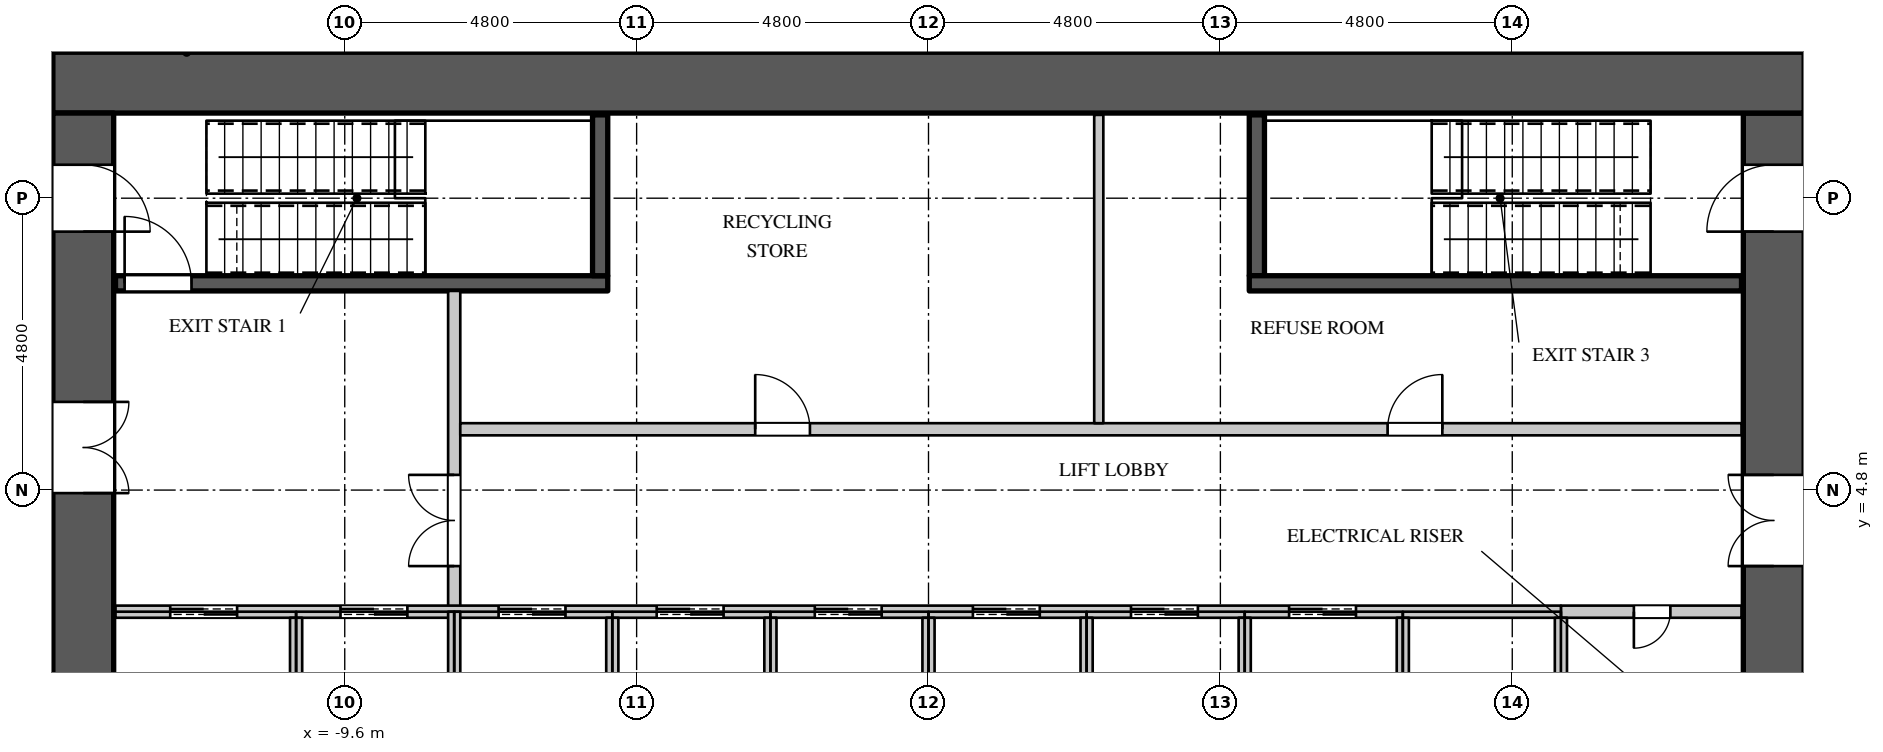
"""IFC4 building model, lengths in metres.
Left out: names, types, materials, properties, quantities, classifications, styles, units other than length and angle.
Written with IfcOpenShell. Run it as: python <this file> out.ifc"""

import sys

from ifc_helpers import new_model, si_unit, direction, frame, frame_2d, origin, place, context, subcontext, project, spatial, rectangle, extrude, element, fill, save


model = new_model("IFC4")
c1 = context("Model", 3, precision=1e-05, world=origin(), true_north=direction((0.0, 1.0)))
c2 = subcontext(c1, "Body", "Model", "MODEL_VIEW")
j1 = project(units=[si_unit("LENGTHUNIT", "METRE"), si_unit("PLANEANGLEUNIT", "RADIAN")], contexts=[c1])
p1 = place(None, origin())
s1 = spatial("IfcSite", under=j1, at=p1, CompositionType="ELEMENT")
p2 = place(p1, origin())
s2 = spatial("IfcBuilding", under=s1, at=p2, CompositionType="ELEMENT")
p3 = place(p2, frame((0.0, 0.0, 92.7)))
s3 = spatial("IfcBuildingStorey", under=s2, at=p3, CompositionType="ELEMENT", Elevation=92.7)
p4 = place(p3, frame((-14.4, 11.5, 0.0), z_axis=(0.0, 0.0, 1.0), x_axis=(1.0, 0.0, 0.0)))
e1 = element("IfcWall", 1, at=p4, inside=s3, PredefinedType="SHEAR", context=c2, shape_type="SweptSolid", body=[
    extrude(rectangle(XDim=28.8, YDim=1.0, at=frame_2d((14.4, 0.0))), origin(), (0.0, 0.0, 1.0), 4.2),
])
p5 = place(p3, frame((13.9, -11.0, 0.0), z_axis=(0.0, 0.0, 1.0), x_axis=(0.0, 1.0, 0.0)))
e2 = element("IfcWall", 2, at=p5, inside=s3, PredefinedType="SHEAR", context=c2, shape_type="SweptSolid", body=[
    extrude(rectangle(XDim=22.0, YDim=1.0, at=frame_2d((11.0, 0.0))), origin(), (0.0, 0.0, 1.0), 4.2),
])
p6 = place(p5, frame((20.05, 0.0, 0.0)))
e3 = element("IfcOpeningElement", 3, at=p6, cuts=e2, PredefinedType="OPENING", context=c2, shape_type="SweptSolid", body=[
    extrude(rectangle(XDim=1.1, YDim=2.2, at=frame_2d((0.55, 1.1))), frame((0.0, 0.51, 0.0), z_axis=(0.0, -1.0, 0.0), x_axis=(1.0, 0.0, 0.0)), (0.0, 0.0, 1.0), 1.02),
])
p7 = place(p5, frame((0.85, 0.0, 0.0)))
e4 = element("IfcOpeningElement", 4, at=p7, cuts=e2, PredefinedType="OPENING", context=c2, shape_type="SweptSolid", body=[
    extrude(rectangle(XDim=1.1, YDim=2.2, at=frame_2d((0.55, 1.1))), frame((0.0, 0.51, 0.0), z_axis=(0.0, -1.0, 0.0), x_axis=(1.0, 0.0, 0.0)), (0.0, 0.0, 1.0), 1.02),
])
p8 = place(p5, frame((14.55, 0.0, 0.0)))
e5 = element("IfcOpeningElement", 5, at=p8, cuts=e2, PredefinedType="OPENING", context=c2, shape_type="SweptSolid", body=[
    extrude(rectangle(XDim=1.5, YDim=2.4, at=frame_2d((0.75, 1.2))), frame((0.0, 0.51, 0.0), z_axis=(0.0, -1.0, 0.0), x_axis=(1.0, 0.0, 0.0)), (0.0, 0.0, 1.0), 1.02),
])
p9 = place(p5, frame((5.95, 0.0, 0.0)))
e6 = element("IfcOpeningElement", 6, at=p9, cuts=e2, PredefinedType="OPENING", context=c2, shape_type="SweptSolid", body=[
    extrude(rectangle(XDim=1.5, YDim=2.4, at=frame_2d((0.75, 1.2))), frame((0.0, 0.51, 0.0), z_axis=(0.0, -1.0, 0.0), x_axis=(1.0, 0.0, 0.0)), (0.0, 0.0, 1.0), 1.02),
])
p10 = place(p3, frame((-13.9, -11.0, 0.0), z_axis=(0.0, 0.0, 1.0), x_axis=(0.0, 1.0, 0.0)))
e7 = element("IfcWall", 7, at=p10, inside=s3, PredefinedType="SHEAR", context=c2, shape_type="SweptSolid", body=[
    extrude(rectangle(XDim=22.0, YDim=1.0, at=frame_2d((11.0, 0.0))), origin(), (0.0, 0.0, 1.0), 4.2),
])
p11 = place(p10, frame((20.05, 0.0, 0.0)))
e8 = element("IfcOpeningElement", 8, at=p11, cuts=e7, PredefinedType="OPENING", context=c2, shape_type="SweptSolid", body=[
    extrude(rectangle(XDim=1.1, YDim=2.2, at=frame_2d((0.55, 1.1))), frame((0.0, 0.51, 0.0), z_axis=(0.0, -1.0, 0.0), x_axis=(1.0, 0.0, 0.0)), (0.0, 0.0, 1.0), 1.02),
])
p12 = place(p10, frame((0.85, 0.0, 0.0)))
e9 = element("IfcOpeningElement", 9, at=p12, cuts=e7, PredefinedType="OPENING", context=c2, shape_type="SweptSolid", body=[
    extrude(rectangle(XDim=1.1, YDim=2.2, at=frame_2d((0.55, 1.1))), frame((0.0, 0.51, 0.0), z_axis=(0.0, -1.0, 0.0), x_axis=(1.0, 0.0, 0.0)), (0.0, 0.0, 1.0), 1.02),
])
p13 = place(p10, frame((15.75, 0.0, 0.0)))
e10 = element("IfcOpeningElement", 10, at=p13, cuts=e7, PredefinedType="OPENING", context=c2, shape_type="SweptSolid", body=[
    extrude(rectangle(XDim=1.5, YDim=2.4, at=frame_2d((0.75, 1.2))), frame((0.0, 0.51, 0.0), z_axis=(0.0, -1.0, 0.0), x_axis=(1.0, 0.0, 0.0)), (0.0, 0.0, 1.0), 1.02),
])
p14 = place(p10, frame((4.75, 0.0, 0.0)))
e11 = element("IfcOpeningElement", 11, at=p14, cuts=e7, PredefinedType="OPENING", context=c2, shape_type="SweptSolid", body=[
    extrude(rectangle(XDim=1.5, YDim=2.4, at=frame_2d((0.75, 1.2))), frame((0.0, 0.51, 0.0), z_axis=(0.0, -1.0, 0.0), x_axis=(1.0, 0.0, 0.0)), (0.0, 0.0, 1.0), 1.02),
])
p15 = place(p3, frame((-7.8, 2.8, 0.0), z_axis=(0.0, 0.0, 1.0), x_axis=(0.0, 1.0, 0.0)))
e12 = element("IfcWall", 12, at=p15, inside=s3, PredefinedType="PARTITIONING", context=c2, shape_type="SweptSolid", body=[
    extrude(rectangle(XDim=5.275, YDim=0.2, at=frame_2d((2.637, 0.0))), origin(), (0.0, 0.0, 1.0), 3.798),
])
p16 = place(p15, frame((0.75, 0.0, 0.0)))
e13 = element("IfcOpeningElement", 13, at=p16, cuts=e12, PredefinedType="OPENING", context=c2, shape_type="SweptSolid", body=[
    extrude(rectangle(XDim=1.5, YDim=2.4, at=frame_2d((0.75, 1.2))), frame((0.0, 0.11, 0.0), z_axis=(0.0, -1.0, 0.0), x_axis=(1.0, 0.0, 0.0)), (0.0, 0.0, 1.0), 0.22),
])
p17 = place(p3, frame((-7.7, 5.8, 0.0), z_axis=(0.0, 0.0, 1.0), x_axis=(1.0, 0.0, 0.0)))
e14 = element("IfcWall", 14, at=p17, inside=s3, PredefinedType="PARTITIONING", context=c2, shape_type="SweptSolid", body=[
    extrude(rectangle(XDim=21.07, YDim=0.2, at=frame_2d((10.535, 0.0))), origin(), (0.0, 0.0, 1.0), 3.798),
])
p18 = place(p17, frame((4.85, 0.0, 0.0)))
e15 = element("IfcOpeningElement", 15, at=p18, cuts=e14, PredefinedType="OPENING", context=c2, shape_type="SweptSolid", body=[
    extrude(rectangle(XDim=0.9, YDim=2.2, at=frame_2d((0.45, 1.1))), frame((0.0, 0.11, 0.0), z_axis=(0.0, -1.0, 0.0), x_axis=(1.0, 0.0, 0.0)), (0.0, 0.0, 1.0), 0.22),
])
p19 = place(p17, frame((15.25, 0.0, 0.0)))
e16 = element("IfcOpeningElement", 16, at=p19, cuts=e14, PredefinedType="OPENING", context=c2, shape_type="SweptSolid", body=[
    extrude(rectangle(XDim=0.9, YDim=2.2, at=frame_2d((0.45, 1.1))), frame((0.0, 0.11, 0.0), z_axis=(0.0, -1.0, 0.0), x_axis=(1.0, 0.0, 0.0)), (0.0, 0.0, 1.0), 0.22),
])
p20 = place(p3, frame((2.8, 5.9, 0.0), z_axis=(0.0, 0.0, 1.0), x_axis=(0.0, 1.0, 0.0)))
e17 = element("IfcWall", 17, at=p20, inside=s3, PredefinedType="PARTITIONING", context=c2, shape_type="SweptSolid", body=[
    extrude(rectangle(XDim=5.07, YDim=0.15, at=frame_2d((2.535, 0.0))), origin(), (0.0, 0.0, 1.0), 3.798),
])
p21 = place(p3, frame((10.4, 2.8, 0.0), z_axis=(0.0, 0.0, 1.0), x_axis=(1.0, 0.0, 0.0)))
e18 = element("IfcWall", 18, at=p21, inside=s3, PredefinedType="PARTITIONING", context=c2, shape_type="SweptSolid", body=[
    extrude(rectangle(XDim=2.97, YDim=0.2, at=frame_2d((1.485, 0.0))), origin(), (0.0, 0.0, 1.0), 3.798),
])
p22 = place(p21, frame((1.2, 0.0, 0.0)))
e19 = element("IfcOpeningElement", 19, at=p22, cuts=e18, PredefinedType="OPENING", context=c2, shape_type="SweptSolid", body=[
    extrude(rectangle(XDim=0.6, YDim=2.0, at=frame_2d((0.3, 1.0))), frame((0.0, 0.11, 0.0), z_axis=(0.0, -1.0, 0.0), x_axis=(1.0, 0.0, 0.0)), (0.0, 0.0, 1.0), 0.22),
])
p23 = place(p3, frame((-13.37, 2.8, 0.0), z_axis=(0.0, 0.0, 1.0), x_axis=(1.0, 0.0, 0.0)))
e20 = element("IfcWall", 20, at=p23, inside=s3, PredefinedType="PARTITIONING", context=c2, shape_type="SweptSolid", body=[
    extrude(rectangle(XDim=23.77, YDim=0.2, at=frame_2d((11.885, 0.0))), origin(), (0.0, 0.0, 1.0), 3.798),
])
p24 = place(p23, frame((0.9, 0.0, 0.0)))
e21 = element("IfcOpeningElement", 21, at=p24, cuts=e20, PredefinedType="OPENING", context=c2, shape_type="SweptSolid", body=[
    extrude(rectangle(XDim=1.1, YDim=2.2, at=frame_2d((0.55, 1.1))), frame((0.0, 0.11, 0.0), z_axis=(0.0, -1.0, 0.0), x_axis=(1.0, 0.0, 0.0)), (0.0, 0.0, 1.0), 0.22),
])
p25 = place(p23, frame((3.7, 0.0, 0.0)))
e22 = element("IfcOpeningElement", 22, at=p25, cuts=e20, PredefinedType="OPENING", context=c2, shape_type="SweptSolid", body=[
    extrude(rectangle(XDim=1.1, YDim=2.2, at=frame_2d((0.55, 1.1))), frame((0.0, 0.11, 0.0), z_axis=(0.0, -1.0, 0.0), x_axis=(1.0, 0.0, 0.0)), (0.0, 0.0, 1.0), 0.22),
])
p26 = place(p23, frame((6.3, 0.0, 0.0)))
e23 = element("IfcOpeningElement", 23, at=p26, cuts=e20, PredefinedType="OPENING", context=c2, shape_type="SweptSolid", body=[
    extrude(rectangle(XDim=1.1, YDim=2.2, at=frame_2d((0.55, 1.1))), frame((0.0, 0.11, 0.0), z_axis=(0.0, -1.0, 0.0), x_axis=(1.0, 0.0, 0.0)), (0.0, 0.0, 1.0), 0.22),
])
p27 = place(p23, frame((8.9, 0.0, 0.0)))
e24 = element("IfcOpeningElement", 24, at=p27, cuts=e20, PredefinedType="OPENING", context=c2, shape_type="SweptSolid", body=[
    extrude(rectangle(XDim=1.1, YDim=2.2, at=frame_2d((0.55, 1.1))), frame((0.0, 0.11, 0.0), z_axis=(0.0, -1.0, 0.0), x_axis=(1.0, 0.0, 0.0)), (0.0, 0.0, 1.0), 0.22),
])
p28 = place(p23, frame((11.5, 0.0, 0.0)))
e25 = element("IfcOpeningElement", 25, at=p28, cuts=e20, PredefinedType="OPENING", context=c2, shape_type="SweptSolid", body=[
    extrude(rectangle(XDim=1.1, YDim=2.2, at=frame_2d((0.55, 1.1))), frame((0.0, 0.11, 0.0), z_axis=(0.0, -1.0, 0.0), x_axis=(1.0, 0.0, 0.0)), (0.0, 0.0, 1.0), 0.22),
])
p29 = place(p23, frame((14.1, 0.0, 0.0)))
e26 = element("IfcOpeningElement", 26, at=p29, cuts=e20, PredefinedType="OPENING", context=c2, shape_type="SweptSolid", body=[
    extrude(rectangle(XDim=1.1, YDim=2.2, at=frame_2d((0.55, 1.1))), frame((0.0, 0.11, 0.0), z_axis=(0.0, -1.0, 0.0), x_axis=(1.0, 0.0, 0.0)), (0.0, 0.0, 1.0), 0.22),
])
p30 = place(p23, frame((16.7, 0.0, 0.0)))
e27 = element("IfcOpeningElement", 27, at=p30, cuts=e20, PredefinedType="OPENING", context=c2, shape_type="SweptSolid", body=[
    extrude(rectangle(XDim=1.1, YDim=2.2, at=frame_2d((0.55, 1.1))), frame((0.0, 0.11, 0.0), z_axis=(0.0, -1.0, 0.0), x_axis=(1.0, 0.0, 0.0)), (0.0, 0.0, 1.0), 0.22),
])
p31 = place(p23, frame((19.3, 0.0, 0.0)))
e28 = element("IfcOpeningElement", 28, at=p31, cuts=e20, PredefinedType="OPENING", context=c2, shape_type="SweptSolid", body=[
    extrude(rectangle(XDim=1.1, YDim=2.2, at=frame_2d((0.55, 1.1))), frame((0.0, 0.11, 0.0), z_axis=(0.0, -1.0, 0.0), x_axis=(1.0, 0.0, 0.0)), (0.0, 0.0, 1.0), 0.22),
])
p32 = place(p3, frame((-10.4, 0.0, 0.0), z_axis=(0.0, 0.0, 1.0), x_axis=(0.0, 1.0, 0.0)))
e29 = element("IfcWall", 29, at=p32, inside=s3, PredefinedType="PARTITIONING", context=c2, shape_type="SweptSolid", body=[
    extrude(rectangle(XDim=2.7, YDim=0.2, at=frame_2d((1.35, 0.0))), origin(), (0.0, 0.0, 1.0), 3.798),
])
p33 = place(p3, frame((-7.8, 0.0, 0.0), z_axis=(0.0, 0.0, 1.0), x_axis=(0.0, 1.0, 0.0)))
e30 = element("IfcWall", 30, at=p33, inside=s3, PredefinedType="PARTITIONING", context=c2, shape_type="SweptSolid", body=[
    extrude(rectangle(XDim=2.8, YDim=0.2, at=frame_2d((1.4, 0.0))), origin(), (0.0, 0.0, 1.0), 3.798),
])
p34 = place(p3, frame((-5.2, 0.1, 0.0), z_axis=(0.0, 0.0, 1.0), x_axis=(0.0, 1.0, 0.0)))
e31 = element("IfcWall", 31, at=p34, inside=s3, PredefinedType="PARTITIONING", context=c2, shape_type="SweptSolid", body=[
    extrude(rectangle(XDim=2.6, YDim=0.2, at=frame_2d((1.3, 0.0))), origin(), (0.0, 0.0, 1.0), 3.798),
])
p35 = place(p3, frame((-2.6, 0.0, 0.0), z_axis=(0.0, 0.0, 1.0), x_axis=(0.0, 1.0, 0.0)))
e32 = element("IfcWall", 32, at=p35, inside=s3, PredefinedType="PARTITIONING", context=c2, shape_type="SweptSolid", body=[
    extrude(rectangle(XDim=2.7, YDim=0.2, at=frame_2d((1.35, 0.0))), origin(), (0.0, 0.0, 1.0), 3.798),
])
p36 = place(p3, frame((0.0, 0.1, 0.0), z_axis=(0.0, 0.0, 1.0), x_axis=(0.0, 1.0, 0.0)))
e33 = element("IfcWall", 33, at=p36, inside=s3, PredefinedType="PARTITIONING", context=c2, shape_type="SweptSolid", body=[
    extrude(rectangle(XDim=2.6, YDim=0.2, at=frame_2d((1.3, 0.0))), origin(), (0.0, 0.0, 1.0), 3.798),
])
p37 = place(p3, frame((2.6, 0.0, 0.0), z_axis=(0.0, 0.0, 1.0), x_axis=(0.0, 1.0, 0.0)))
e34 = element("IfcWall", 34, at=p37, inside=s3, PredefinedType="PARTITIONING", context=c2, shape_type="SweptSolid", body=[
    extrude(rectangle(XDim=2.7, YDim=0.2, at=frame_2d((1.35, 0.0))), origin(), (0.0, 0.0, 1.0), 3.798),
])
p38 = place(p3, frame((5.2, 0.1, 0.0), z_axis=(0.0, 0.0, 1.0), x_axis=(0.0, 1.0, 0.0)))
e35 = element("IfcWall", 35, at=p38, inside=s3, PredefinedType="PARTITIONING", context=c2, shape_type="SweptSolid", body=[
    extrude(rectangle(XDim=2.6, YDim=0.2, at=frame_2d((1.3, 0.0))), origin(), (0.0, 0.0, 1.0), 3.798),
])
p39 = place(p3, frame((7.8, 0.0, 0.0), z_axis=(0.0, 0.0, 1.0), x_axis=(0.0, 1.0, 0.0)))
e36 = element("IfcWall", 36, at=p39, inside=s3, PredefinedType="PARTITIONING", context=c2, shape_type="SweptSolid", body=[
    extrude(rectangle(XDim=2.7, YDim=0.2, at=frame_2d((1.35, 0.0))), origin(), (0.0, 0.0, 1.0), 3.798),
])
p40 = place(p3, frame((10.4, -2.7, 0.0), z_axis=(0.0, 0.0, 1.0), x_axis=(0.0, 1.0, 0.0)))
e37 = element("IfcWall", 37, at=p40, inside=s3, PredefinedType="PARTITIONING", context=c2, shape_type="SweptSolid", body=[
    extrude(rectangle(XDim=5.4, YDim=0.2, at=frame_2d((2.7, 0.0))), origin(), (0.0, 0.0, 1.0), 3.798),
])
p41 = place(p3, frame((-13.37, 8.2, 0.0), z_axis=(0.0, 0.0, 1.0), x_axis=(1.0, 0.0, 0.0)))
e38 = element("IfcWall", 38, at=p41, inside=s3, PredefinedType="SHEAR", context=c2, shape_type="SweptSolid", body=[
    extrude(rectangle(XDim=8.095, YDim=0.25, at=frame_2d((4.048, 0.0))), origin(), (0.0, 0.0, 1.0), 3.798),
])
p42 = place(p41, frame((0.15, 0.0, 0.0)))
e39 = element("IfcOpeningElement", 39, at=p42, cuts=e38, PredefinedType="OPENING", context=c2, shape_type="SweptSolid", body=[
    extrude(rectangle(XDim=1.1, YDim=2.2, at=frame_2d((0.55, 1.1))), frame((0.0, 0.135, 0.0), z_axis=(0.0, -1.0, 0.0), x_axis=(1.0, 0.0, 0.0)), (0.0, 0.0, 1.0), 0.27),
])
for number, where, z_axis, x_axis in (
    (40, (-5.4, 8.325, 0.0), (0.0, 0.0, 1.0), (0.0, 1.0, 0.0)),
    (41, (5.4, 8.325, 0.0), (0.0, 0.0, 1.0), (0.0, 1.0, 0.0)),
):
    element("IfcWall", number, at=place(p3, frame(where, z_axis=z_axis, x_axis=x_axis)), inside=s3, PredefinedType="SHEAR", context=c2, shape_type="SweptSolid", body=[
        extrude(rectangle(XDim=2.645, YDim=0.25, at=frame_2d((1.323, 0.0))), origin(), (0.0, 0.0, 1.0), 3.798),
    ])
p43 = place(p3, frame((5.275, 8.2, 0.0), z_axis=(0.0, 0.0, 1.0), x_axis=(1.0, 0.0, 0.0)))
e42 = element("IfcWall", 42, at=p43, inside=s3, PredefinedType="SHEAR", context=c2, shape_type="SweptSolid", body=[
    extrude(rectangle(XDim=8.095, YDim=0.25, at=frame_2d((4.048, 0.0))), origin(), (0.0, 0.0, 1.0), 3.798),
])
p44 = place(p22, origin())
e43 = element("IfcDoor", 43, at=p44, inside=s3, OperationType="SINGLE_SWING_RIGHT", PredefinedType="DOOR", context=c2, shape_type="SweptSolid", body=[
    extrude(rectangle(XDim=0.6, YDim=2.0, at=frame_2d((0.3, 1.0))), frame((0.0, 0.025, 0.0), z_axis=(0.0, -1.0, 0.0), x_axis=(1.0, 0.0, 0.0)), (0.0, 0.0, 1.0), 0.05),
])
fill(e19, e43)
p45 = place(p18, origin())
e44 = element("IfcDoor", 44, at=p45, inside=s3, OperationType="SINGLE_SWING_LEFT", PredefinedType="DOOR", context=c2, shape_type="SweptSolid", body=[
    extrude(rectangle(XDim=0.9, YDim=2.2, at=frame_2d((0.45, 1.1))), frame((0.0, 0.025, 0.0), z_axis=(0.0, -1.0, 0.0), x_axis=(1.0, 0.0, 0.0)), (0.0, 0.0, 1.0), 0.05),
])
fill(e15, e44)
p46 = place(p19, origin())
e45 = element("IfcDoor", 45, at=p46, inside=s3, OperationType="SINGLE_SWING_RIGHT", PredefinedType="DOOR", context=c2, shape_type="SweptSolid", body=[
    extrude(rectangle(XDim=0.9, YDim=2.2, at=frame_2d((0.45, 1.1))), frame((0.0, 0.025, 0.0), z_axis=(0.0, -1.0, 0.0), x_axis=(1.0, 0.0, 0.0)), (0.0, 0.0, 1.0), 0.05),
])
fill(e16, e45)
p47 = place(p24, origin())
e46 = element("IfcDoor", 46, at=p47, inside=s3, OperationType="DOUBLE_DOOR_SLIDING", PredefinedType="DOOR", context=c2, shape_type="SweptSolid", body=[
    extrude(rectangle(XDim=1.1, YDim=2.2, at=frame_2d((0.55, 1.1))), frame((0.0, 0.025, 0.0), z_axis=(0.0, -1.0, 0.0), x_axis=(1.0, 0.0, 0.0)), (0.0, 0.0, 1.0), 0.05),
])
fill(e21, e46)
p48 = place(p25, origin())
e47 = element("IfcDoor", 47, at=p48, inside=s3, OperationType="DOUBLE_DOOR_SLIDING", PredefinedType="DOOR", context=c2, shape_type="SweptSolid", body=[
    extrude(rectangle(XDim=1.1, YDim=2.2, at=frame_2d((0.55, 1.1))), frame((0.0, 0.025, 0.0), z_axis=(0.0, -1.0, 0.0), x_axis=(1.0, 0.0, 0.0)), (0.0, 0.0, 1.0), 0.05),
])
fill(e22, e47)
p49 = place(p26, origin())
e48 = element("IfcDoor", 48, at=p49, inside=s3, OperationType="DOUBLE_DOOR_SLIDING", PredefinedType="DOOR", context=c2, shape_type="SweptSolid", body=[
    extrude(rectangle(XDim=1.1, YDim=2.2, at=frame_2d((0.55, 1.1))), frame((0.0, 0.025, 0.0), z_axis=(0.0, -1.0, 0.0), x_axis=(1.0, 0.0, 0.0)), (0.0, 0.0, 1.0), 0.05),
])
fill(e23, e48)
p50 = place(p27, origin())
e49 = element("IfcDoor", 49, at=p50, inside=s3, OperationType="DOUBLE_DOOR_SLIDING", PredefinedType="DOOR", context=c2, shape_type="SweptSolid", body=[
    extrude(rectangle(XDim=1.1, YDim=2.2, at=frame_2d((0.55, 1.1))), frame((0.0, 0.025, 0.0), z_axis=(0.0, -1.0, 0.0), x_axis=(1.0, 0.0, 0.0)), (0.0, 0.0, 1.0), 0.05),
])
fill(e24, e49)
p51 = place(p28, origin())
e50 = element("IfcDoor", 50, at=p51, inside=s3, OperationType="DOUBLE_DOOR_SLIDING", PredefinedType="DOOR", context=c2, shape_type="SweptSolid", body=[
    extrude(rectangle(XDim=1.1, YDim=2.2, at=frame_2d((0.55, 1.1))), frame((0.0, 0.025, 0.0), z_axis=(0.0, -1.0, 0.0), x_axis=(1.0, 0.0, 0.0)), (0.0, 0.0, 1.0), 0.05),
])
fill(e25, e50)
p52 = place(p29, origin())
e51 = element("IfcDoor", 51, at=p52, inside=s3, OperationType="DOUBLE_DOOR_SLIDING", PredefinedType="DOOR", context=c2, shape_type="SweptSolid", body=[
    extrude(rectangle(XDim=1.1, YDim=2.2, at=frame_2d((0.55, 1.1))), frame((0.0, 0.025, 0.0), z_axis=(0.0, -1.0, 0.0), x_axis=(1.0, 0.0, 0.0)), (0.0, 0.0, 1.0), 0.05),
])
fill(e26, e51)
p53 = place(p30, origin())
e52 = element("IfcDoor", 52, at=p53, inside=s3, OperationType="DOUBLE_DOOR_SLIDING", PredefinedType="DOOR", context=c2, shape_type="SweptSolid", body=[
    extrude(rectangle(XDim=1.1, YDim=2.2, at=frame_2d((0.55, 1.1))), frame((0.0, 0.025, 0.0), z_axis=(0.0, -1.0, 0.0), x_axis=(1.0, 0.0, 0.0)), (0.0, 0.0, 1.0), 0.05),
])
fill(e27, e52)
p54 = place(p31, origin())
e53 = element("IfcDoor", 53, at=p54, inside=s3, OperationType="DOUBLE_DOOR_SLIDING", PredefinedType="DOOR", context=c2, shape_type="SweptSolid", body=[
    extrude(rectangle(XDim=1.1, YDim=2.2, at=frame_2d((0.55, 1.1))), frame((0.0, 0.025, 0.0), z_axis=(0.0, -1.0, 0.0), x_axis=(1.0, 0.0, 0.0)), (0.0, 0.0, 1.0), 0.05),
])
fill(e28, e53)
p55 = place(p42, origin())
e54 = element("IfcDoor", 54, at=p55, inside=s3, OperationType="SINGLE_SWING_LEFT", PredefinedType="DOOR", context=c2, shape_type="SweptSolid", body=[
    extrude(rectangle(XDim=1.1, YDim=2.2, at=frame_2d((0.55, 1.1))), frame((0.0, 0.025, 0.0), z_axis=(0.0, -1.0, 0.0), x_axis=(1.0, 0.0, 0.0)), (0.0, 0.0, 1.0), 0.05),
])
fill(e39, e54)
p56 = place(p16, origin())
e55 = element("IfcDoor", 55, at=p56, inside=s3, OperationType="DOUBLE_DOOR_SINGLE_SWING", PredefinedType="DOOR", context=c2, shape_type="SweptSolid", body=[
    extrude(rectangle(XDim=1.5, YDim=2.4, at=frame_2d((0.75, 1.2))), frame((0.0, 0.025, 0.0), z_axis=(0.0, -1.0, 0.0), x_axis=(1.0, 0.0, 0.0)), (0.0, 0.0, 1.0), 0.05),
])
fill(e13, e55)
p57 = place(p11, origin())
e56 = element("IfcDoor", 56, at=p57, inside=s3, OperationType="SINGLE_SWING_RIGHT", PredefinedType="DOOR", context=c2, shape_type="SweptSolid", body=[
    extrude(rectangle(XDim=1.1, YDim=2.2, at=frame_2d((0.55, 1.1))), frame((0.0, -0.445, 0.0), z_axis=(0.0, -1.0, 0.0), x_axis=(1.0, 0.0, 0.0)), (0.0, 0.0, 1.0), 0.05),
])
fill(e8, e56)
p58 = place(p6, origin())
e57 = element("IfcDoor", 57, at=p58, inside=s3, OperationType="SINGLE_SWING_LEFT", PredefinedType="DOOR", context=c2, shape_type="SweptSolid", body=[
    extrude(rectangle(XDim=1.1, YDim=2.2, at=frame_2d((0.55, 1.1))), frame((0.0, 0.495, 0.0), z_axis=(0.0, -1.0, 0.0), x_axis=(1.0, 0.0, 0.0)), (0.0, 0.0, 1.0), 0.05),
])
fill(e3, e57)
p59 = place(p13, origin())
e58 = element("IfcDoor", 58, at=p59, inside=s3, OperationType="DOUBLE_DOOR_SINGLE_SWING", PredefinedType="DOOR", context=c2, shape_type="SweptSolid", body=[
    extrude(rectangle(XDim=1.5, YDim=2.4, at=frame_2d((0.75, 1.2))), frame((0.0, -0.445, 0.0), z_axis=(0.0, -1.0, 0.0), x_axis=(1.0, 0.0, 0.0)), (0.0, 0.0, 1.0), 0.05),
])
fill(e10, e58)
p60 = place(p8, origin())
e59 = element("IfcDoor", 59, at=p60, inside=s3, OperationType="DOUBLE_DOOR_SINGLE_SWING", PredefinedType="DOOR", context=c2, shape_type="SweptSolid", body=[
    extrude(rectangle(XDim=1.5, YDim=2.4, at=frame_2d((0.75, 1.2))), frame((0.0, 0.495, 0.0), z_axis=(0.0, -1.0, 0.0), x_axis=(1.0, 0.0, 0.0)), (0.0, 0.0, 1.0), 0.05),
])
fill(e5, e59)
save(model, sys.argv[1])
